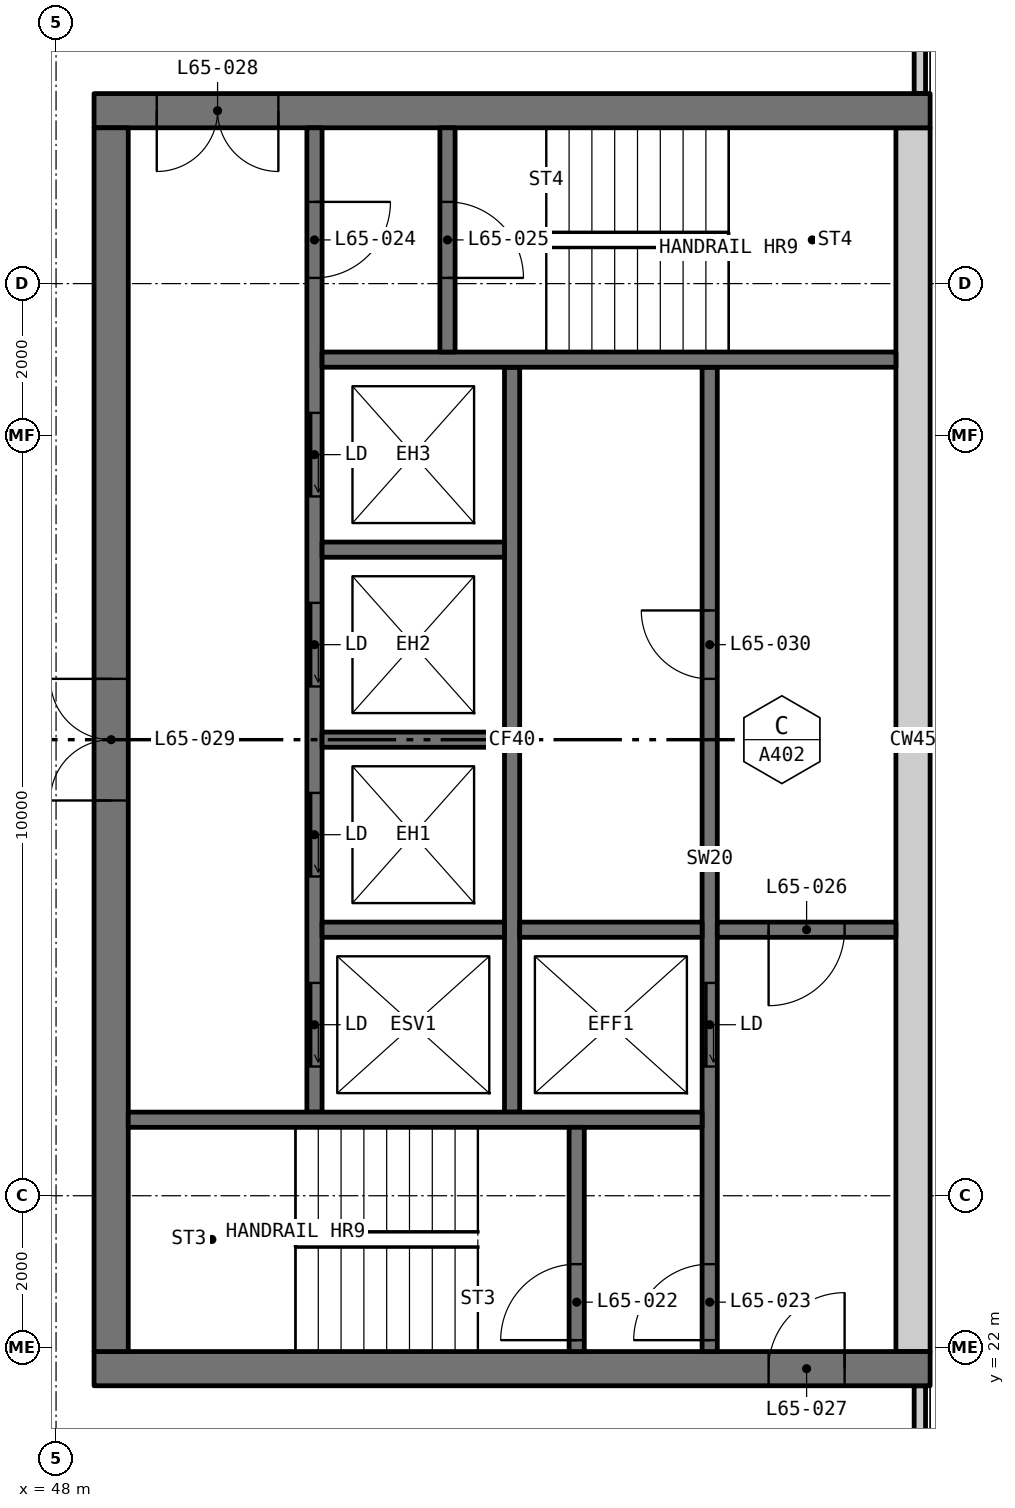
"""IFC4 building model, lengths in metres.
Left out: names, types, materials, properties, quantities, classifications, styles, units other than length and angle.
Written with IfcOpenShell. Run it as: python <this file> out.ifc"""

import sys

from ifc_helpers import new_model, si_unit, direction, frame, frame_2d, origin, place, context, subcontext, project, spatial, rectangle, extrude, element, fill, save


model = new_model("IFC4")
c1 = context("Model", 3, precision=1e-05, world=origin(), true_north=direction((0.0, 1.0)))
c2 = subcontext(c1, "Body", "Model", "MODEL_VIEW")
j1 = project(units=[si_unit("LENGTHUNIT", "METRE"), si_unit("PLANEANGLEUNIT", "RADIAN")], contexts=[c1])
p1 = place(None, origin())
s1 = spatial("IfcSite", under=j1, at=p1, CompositionType="ELEMENT")
p2 = place(p1, origin())
s2 = spatial("IfcBuilding", under=s1, at=p2, CompositionType="ELEMENT")
p3 = place(p2, frame((0.0, 0.0, 242.1)))
s3 = spatial("IfcBuildingStorey", under=s2, at=p3, CompositionType="ELEMENT", Elevation=242.1)
for number, where, z_axis, x_axis in (
    (1, (59.365, 18.71, 0.0), (0.0, 0.0, 1.0), (0.0, 1.0, 0.0)),
    (2, (59.365, 38.5, 0.0), (0.0, 0.0, 1.0), (0.0, 1.0, 0.0)),
):
    element("IfcWall", number, at=place(p3, frame(where, z_axis=z_axis, x_axis=x_axis)), inside=s3, PredefinedType="ELEMENTEDWALL", context=c2, shape_type="SweptSolid", body=[
        extrude(rectangle(XDim=2.79, YDim=0.15, at=frame_2d((1.395, 0.0))), origin(), (0.0, 0.0, 1.0), 3.05),
    ])
p4 = place(p3, frame((59.5, 21.725, 0.0), z_axis=(0.0, 0.0, 1.0), x_axis=(-1.0, 0.0, 0.0)))
e3 = element("IfcWall", 3, at=p4, inside=s3, PredefinedType="SHEAR", context=c2, shape_type="SweptSolid", body=[
    extrude(rectangle(XDim=11.0, YDim=0.45, at=frame_2d((5.5, 0.0))), origin(), (0.0, 0.0, 1.0), 3.05),
])
p5 = place(p4, frame((1.125, 0.0, 0.0)))
e4 = element("IfcOpeningElement", 4, at=p5, cuts=e3, PredefinedType="OPENING", context=c2, shape_type="SweptSolid", body=[
    extrude(rectangle(XDim=1.0, YDim=2.1, at=frame_2d((0.5, 1.05))), frame((0.0, 0.235, 0.0), z_axis=(0.0, -1.0, 0.0), x_axis=(1.0, 0.0, 0.0)), (0.0, 0.0, 1.0), 0.47),
])
p6 = place(p3, frame((59.5, 38.275, 0.0), z_axis=(0.0, 0.0, 1.0), x_axis=(-1.0, 0.0, 0.0)))
e5 = element("IfcWall", 5, at=p6, inside=s3, PredefinedType="SHEAR", context=c2, shape_type="SweptSolid", body=[
    extrude(rectangle(XDim=11.0, YDim=0.45, at=frame_2d((5.5, 0.0))), origin(), (0.0, 0.0, 1.0), 3.05),
])
p7 = place(p6, frame((8.575, 0.0, 0.0)))
e6 = element("IfcOpeningElement", 6, at=p7, cuts=e5, PredefinedType="OPENING", context=c2, shape_type="SweptSolid", body=[
    extrude(rectangle(XDim=1.6, YDim=2.1, at=frame_2d((0.8, 1.05))), frame((0.0, 0.235, 0.0), z_axis=(0.0, -1.0, 0.0), x_axis=(1.0, 0.0, 0.0)), (0.0, 0.0, 1.0), 0.47),
])
p8 = place(p3, frame((59.275, 21.95, 0.0), z_axis=(0.0, 0.0, 1.0), x_axis=(0.0, 1.0, 0.0)))
e7 = element("IfcWall", 7, at=p8, inside=s3, PredefinedType="SHEAR", context=c2, shape_type="SweptSolid", body=[
    extrude(rectangle(XDim=16.1, YDim=0.45, at=frame_2d((8.05, 0.0))), origin(), (0.0, 0.0, 1.0), 3.05),
])
p9 = place(p3, frame((48.725, 21.95, 0.0), z_axis=(0.0, 0.0, 1.0), x_axis=(0.0, 1.0, 0.0)))
e8 = element("IfcWall", 8, at=p9, inside=s3, PredefinedType="SHEAR", context=c2, shape_type="SweptSolid", body=[
    extrude(rectangle(XDim=16.1, YDim=0.45, at=frame_2d((8.05, 0.0))), origin(), (0.0, 0.0, 1.0), 3.05),
])
p10 = place(p9, frame((7.25, 0.0, 0.0)))
e9 = element("IfcOpeningElement", 9, at=p10, cuts=e8, PredefinedType="OPENING", context=c2, shape_type="SweptSolid", body=[
    extrude(rectangle(XDim=1.6, YDim=2.1, at=frame_2d((0.8, 1.05))), frame((0.0, 0.235, 0.0), z_axis=(0.0, -1.0, 0.0), x_axis=(1.0, 0.0, 0.0)), (0.0, 0.0, 1.0), 0.47),
])
p11 = place(p3, frame((56.6, 21.95, 0.0), z_axis=(0.0, 0.0, 1.0), x_axis=(0.0, 1.0, 0.0)))
e10 = element("IfcWall", 10, at=p11, inside=s3, PredefinedType="SOLIDWALL", context=c2, shape_type="SweptSolid", body=[
    extrude(rectangle(XDim=12.95, YDim=0.2, at=frame_2d((6.475, 0.0))), origin(), (0.0, 0.0, 1.0), 3.05),
])
p12 = place(p11, frame((3.75, 0.0, 0.0)))
e11 = element("IfcOpeningElement", 11, at=p12, cuts=e10, PredefinedType="OPENING", context=c2, shape_type="SweptSolid", body=[
    extrude(rectangle(XDim=1.1, YDim=2.1, at=frame_2d((0.55, 1.05))), frame((0.0, 0.11, 0.0), z_axis=(0.0, -1.0, 0.0), x_axis=(1.0, 0.0, 0.0)), (0.0, 0.0, 1.0), 0.22),
])
p13 = place(p11, frame((0.15, 0.0, 0.0)))
e12 = element("IfcOpeningElement", 12, at=p13, cuts=e10, PredefinedType="OPENING", context=c2, shape_type="SweptSolid", body=[
    extrude(rectangle(XDim=1.0, YDim=2.1, at=frame_2d((0.5, 1.05))), frame((0.0, 0.11, 0.0), z_axis=(0.0, -1.0, 0.0), x_axis=(1.0, 0.0, 0.0)), (0.0, 0.0, 1.0), 0.22),
])
p14 = place(p11, frame((8.85, 0.0, 0.0)))
e13 = element("IfcOpeningElement", 13, at=p14, cuts=e10, PredefinedType="OPENING", context=c2, shape_type="SweptSolid", body=[
    extrude(rectangle(XDim=0.9, YDim=2.1, at=frame_2d((0.45, 1.05))), frame((0.0, 0.11, 0.0), z_axis=(0.0, -1.0, 0.0), x_axis=(1.0, 0.0, 0.0)), (0.0, 0.0, 1.0), 0.22),
])
p15 = place(p3, frame((51.4, 25.1, 0.0), z_axis=(0.0, 0.0, 1.0), x_axis=(0.0, 1.0, 0.0)))
e14 = element("IfcWall", 14, at=p15, inside=s3, PredefinedType="SOLIDWALL", context=c2, shape_type="SweptSolid", body=[
    extrude(rectangle(XDim=12.95, YDim=0.2, at=frame_2d((6.475, 0.0))), origin(), (0.0, 0.0, 1.0), 3.05),
])
p16 = place(p15, frame((0.6, 0.0, 0.0)))
e15 = element("IfcOpeningElement", 15, at=p16, cuts=e14, PredefinedType="OPENING", context=c2, shape_type="SweptSolid", body=[
    extrude(rectangle(XDim=1.1, YDim=2.1, at=frame_2d((0.55, 1.05))), frame((0.0, 0.11, 0.0), z_axis=(0.0, -1.0, 0.0), x_axis=(1.0, 0.0, 0.0)), (0.0, 0.0, 1.0), 0.22),
])
p17 = place(p15, frame((3.1, 0.0, 0.0)))
e16 = element("IfcOpeningElement", 16, at=p17, cuts=e14, PredefinedType="OPENING", context=c2, shape_type="SweptSolid", body=[
    extrude(rectangle(XDim=1.1, YDim=2.1, at=frame_2d((0.55, 1.05))), frame((0.0, 0.11, 0.0), z_axis=(0.0, -1.0, 0.0), x_axis=(1.0, 0.0, 0.0)), (0.0, 0.0, 1.0), 0.22),
])
p18 = place(p15, frame((5.6, 0.0, 0.0)))
e17 = element("IfcOpeningElement", 17, at=p18, cuts=e14, PredefinedType="OPENING", context=c2, shape_type="SweptSolid", body=[
    extrude(rectangle(XDim=1.1, YDim=2.1, at=frame_2d((0.55, 1.05))), frame((0.0, 0.11, 0.0), z_axis=(0.0, -1.0, 0.0), x_axis=(1.0, 0.0, 0.0)), (0.0, 0.0, 1.0), 0.22),
])
p19 = place(p15, frame((8.1, 0.0, 0.0)))
e18 = element("IfcOpeningElement", 18, at=p19, cuts=e14, PredefinedType="OPENING", context=c2, shape_type="SweptSolid", body=[
    extrude(rectangle(XDim=1.1, YDim=2.1, at=frame_2d((0.55, 1.05))), frame((0.0, 0.11, 0.0), z_axis=(0.0, -1.0, 0.0), x_axis=(1.0, 0.0, 0.0)), (0.0, 0.0, 1.0), 0.22),
])
p20 = place(p15, frame((10.975, 0.0, 0.0)))
e19 = element("IfcOpeningElement", 19, at=p20, cuts=e14, PredefinedType="OPENING", context=c2, shape_type="SweptSolid", body=[
    extrude(rectangle(XDim=1.0, YDim=2.1, at=frame_2d((0.5, 1.05))), frame((0.0, 0.11, 0.0), z_axis=(0.0, -1.0, 0.0), x_axis=(1.0, 0.0, 0.0)), (0.0, 0.0, 1.0), 0.22),
])
p21 = place(p3, frame((54.0, 25.1, 0.0), z_axis=(0.0, 0.0, 1.0), x_axis=(0.0, 1.0, 0.0)))
e20 = element("IfcWall", 20, at=p21, inside=s3, PredefinedType="SOLIDWALL", context=c2, shape_type="SweptSolid", body=[
    extrude(rectangle(XDim=9.8, YDim=0.2, at=frame_2d((4.9, 0.0))), origin(), (0.0, 0.0, 1.0), 3.05),
])
for number, where, z_axis, x_axis in (
    (21, (56.5, 25.0, 0.0), (0.0, 0.0, 1.0), (-1.0, 0.0, 0.0)),
    (22, (59.05, 35.0, 0.0), (0.0, 0.0, 1.0), (-1.0, 0.0, 0.0)),
):
    element("IfcWall", number, at=place(p3, frame(where, z_axis=z_axis, x_axis=x_axis)), inside=s3, PredefinedType="SOLIDWALL", context=c2, shape_type="SweptSolid", body=[
        extrude(rectangle(XDim=7.55, YDim=0.2, at=frame_2d((3.775, 0.0))), origin(), (0.0, 0.0, 1.0), 3.05),
    ])
p22 = place(p3, frame((59.05, 27.5, 0.0), z_axis=(0.0, 0.0, 1.0), x_axis=(-1.0, 0.0, 0.0)))
e23 = element("IfcWall", 23, at=p22, inside=s3, PredefinedType="SOLIDWALL", context=c2, shape_type="SweptSolid", body=[
    extrude(rectangle(XDim=2.35, YDim=0.2, at=frame_2d((1.175, 0.0))), origin(), (0.0, 0.0, 1.0), 3.05),
])
p23 = place(p22, frame((0.675, 0.0, 0.0)))
e24 = element("IfcOpeningElement", 24, at=p23, cuts=e23, PredefinedType="OPENING", context=c2, shape_type="SweptSolid", body=[
    extrude(rectangle(XDim=1.0, YDim=2.1, at=frame_2d((0.5, 1.05))), frame((0.0, 0.11, 0.0), z_axis=(0.0, -1.0, 0.0), x_axis=(1.0, 0.0, 0.0)), (0.0, 0.0, 1.0), 0.22),
])
p24 = place(p3, frame((54.85, 21.95, 0.0), z_axis=(0.0, 0.0, 1.0), x_axis=(0.0, 1.0, 0.0)))
e25 = element("IfcWall", 25, at=p24, inside=s3, PredefinedType="SOLIDWALL", context=c2, shape_type="SweptSolid", body=[
    extrude(rectangle(XDim=2.95, YDim=0.2, at=frame_2d((1.475, 0.0))), origin(), (0.0, 0.0, 1.0), 3.05),
])
p25 = place(p24, frame((0.15, 0.0, 0.0)))
e26 = element("IfcOpeningElement", 26, at=p25, cuts=e25, PredefinedType="OPENING", context=c2, shape_type="SweptSolid", body=[
    extrude(rectangle(XDim=1.0, YDim=2.1, at=frame_2d((0.5, 1.05))), frame((0.0, 0.11, 0.0), z_axis=(0.0, -1.0, 0.0), x_axis=(1.0, 0.0, 0.0)), (0.0, 0.0, 1.0), 0.22),
])
p26 = place(p3, frame((53.15, 35.1, 0.0), z_axis=(0.0, 0.0, 1.0), x_axis=(0.0, 1.0, 0.0)))
e27 = element("IfcWall", 27, at=p26, inside=s3, PredefinedType="SOLIDWALL", context=c2, shape_type="SweptSolid", body=[
    extrude(rectangle(XDim=2.95, YDim=0.2, at=frame_2d((1.475, 0.0))), origin(), (0.0, 0.0, 1.0), 3.05),
])
p27 = place(p26, frame((0.975, 0.0, 0.0)))
e28 = element("IfcOpeningElement", 28, at=p27, cuts=e27, PredefinedType="OPENING", context=c2, shape_type="SweptSolid", body=[
    extrude(rectangle(XDim=1.0, YDim=2.1, at=frame_2d((0.5, 1.05))), frame((0.0, 0.11, 0.0), z_axis=(0.0, -1.0, 0.0), x_axis=(1.0, 0.0, 0.0)), (0.0, 0.0, 1.0), 0.22),
])
for number, where, z_axis, x_axis in (
    (29, (56.5, 27.5, 0.0), (0.0, 0.0, 1.0), (-1.0, 0.0, 0.0)),
    (30, (53.9, 27.5, 0.0), (0.0, 0.0, 1.0), (-1.0, 0.0, 0.0)),
    (31, (53.9, 30.0, 0.0), (0.0, 0.0, 1.0), (-1.0, 0.0, 0.0)),
    (32, (53.9, 32.5, 0.0), (0.0, 0.0, 1.0), (-1.0, 0.0, 0.0)),
):
    element("IfcWall", number, at=place(p3, frame(where, z_axis=z_axis, x_axis=x_axis)), inside=s3, PredefinedType="SOLIDWALL", context=c2, shape_type="SweptSolid", body=[
        extrude(rectangle(XDim=2.4, YDim=0.2, at=frame_2d((1.2, 0.0))), origin(), (0.0, 0.0, 1.0), 3.05),
    ])
p28 = place(p16, origin())
e33 = element("IfcDoor", 33, at=p28, inside=s3, OperationType="SLIDING_TO_LEFT", PredefinedType="DOOR", context=c2, shape_type="SweptSolid", body=[
    extrude(rectangle(XDim=1.1, YDim=2.1, at=frame_2d((0.55, 1.05))), frame((0.0, 0.025, 0.0), z_axis=(0.0, -1.0, 0.0), x_axis=(1.0, 0.0, 0.0)), (0.0, 0.0, 1.0), 0.05),
])
fill(e15, e33)
p29 = place(p17, origin())
e34 = element("IfcDoor", 34, at=p29, inside=s3, OperationType="SLIDING_TO_LEFT", PredefinedType="DOOR", context=c2, shape_type="SweptSolid", body=[
    extrude(rectangle(XDim=1.1, YDim=2.1, at=frame_2d((0.55, 1.05))), frame((0.0, 0.025, 0.0), z_axis=(0.0, -1.0, 0.0), x_axis=(1.0, 0.0, 0.0)), (0.0, 0.0, 1.0), 0.05),
])
fill(e16, e34)
p30 = place(p18, origin())
e35 = element("IfcDoor", 35, at=p30, inside=s3, OperationType="SLIDING_TO_LEFT", PredefinedType="DOOR", context=c2, shape_type="SweptSolid", body=[
    extrude(rectangle(XDim=1.1, YDim=2.1, at=frame_2d((0.55, 1.05))), frame((0.0, 0.025, 0.0), z_axis=(0.0, -1.0, 0.0), x_axis=(1.0, 0.0, 0.0)), (0.0, 0.0, 1.0), 0.05),
])
fill(e17, e35)
p31 = place(p19, origin())
e36 = element("IfcDoor", 36, at=p31, inside=s3, OperationType="SLIDING_TO_LEFT", PredefinedType="DOOR", context=c2, shape_type="SweptSolid", body=[
    extrude(rectangle(XDim=1.1, YDim=2.1, at=frame_2d((0.55, 1.05))), frame((0.0, 0.025, 0.0), z_axis=(0.0, -1.0, 0.0), x_axis=(1.0, 0.0, 0.0)), (0.0, 0.0, 1.0), 0.05),
])
fill(e18, e36)
p32 = place(p12, origin())
e37 = element("IfcDoor", 37, at=p32, inside=s3, OperationType="SLIDING_TO_LEFT", PredefinedType="DOOR", context=c2, shape_type="SweptSolid", body=[
    extrude(rectangle(XDim=1.1, YDim=2.1, at=frame_2d((0.55, 1.05))), frame((0.0, 0.025, 0.0), z_axis=(0.0, -1.0, 0.0), x_axis=(1.0, 0.0, 0.0)), (0.0, 0.0, 1.0), 0.05),
])
fill(e11, e37)
p33 = place(p25, origin())
e38 = element("IfcDoor", 38, at=p33, inside=s3, OperationType="SINGLE_SWING_RIGHT", PredefinedType="DOOR", context=c2, shape_type="SweptSolid", body=[
    extrude(rectangle(XDim=1.0, YDim=2.1, at=frame_2d((0.5, 1.05))), frame((0.0, 0.025, 0.0), z_axis=(0.0, -1.0, 0.0), x_axis=(1.0, 0.0, 0.0)), (0.0, 0.0, 1.0), 0.05),
])
fill(e26, e38)
p34 = place(p13, origin())
e39 = element("IfcDoor", 39, at=p34, inside=s3, OperationType="SINGLE_SWING_RIGHT", PredefinedType="DOOR", context=c2, shape_type="SweptSolid", body=[
    extrude(rectangle(XDim=1.0, YDim=2.1, at=frame_2d((0.5, 1.05))), frame((0.0, 0.025, 0.0), z_axis=(0.0, -1.0, 0.0), x_axis=(1.0, 0.0, 0.0)), (0.0, 0.0, 1.0), 0.05),
])
fill(e12, e39)
p35 = place(p20, frame((1.0, 0.0, 0.0), x_axis=(-1.0, 0.0, 0.0)))
e40 = element("IfcDoor", 40, at=p35, inside=s3, OperationType="SINGLE_SWING_RIGHT", PredefinedType="DOOR", context=c2, shape_type="SweptSolid", body=[
    extrude(rectangle(XDim=1.0, YDim=2.1, at=frame_2d((0.5, 1.05))), frame((0.0, 0.025, 0.0), z_axis=(0.0, -1.0, 0.0), x_axis=(1.0, 0.0, 0.0)), (0.0, 0.0, 1.0), 0.05),
])
fill(e19, e40)
p36 = place(p27, frame((1.0, 0.0, 0.0), x_axis=(-1.0, 0.0, 0.0)))
e41 = element("IfcDoor", 41, at=p36, inside=s3, OperationType="SINGLE_SWING_LEFT", PredefinedType="DOOR", context=c2, shape_type="SweptSolid", body=[
    extrude(rectangle(XDim=1.0, YDim=2.1, at=frame_2d((0.5, 1.05))), frame((0.0, 0.025, 0.0), z_axis=(0.0, -1.0, 0.0), x_axis=(1.0, 0.0, 0.0)), (0.0, 0.0, 1.0), 0.05),
])
fill(e28, e41)
p37 = place(p23, origin())
e42 = element("IfcDoor", 42, at=p37, inside=s3, OperationType="SINGLE_SWING_LEFT", PredefinedType="DOOR", context=c2, shape_type="SweptSolid", body=[
    extrude(rectangle(XDim=1.0, YDim=2.1, at=frame_2d((0.5, 1.05))), frame((0.0, 0.025, 0.0), z_axis=(0.0, -1.0, 0.0), x_axis=(1.0, 0.0, 0.0)), (0.0, 0.0, 1.0), 0.05),
])
fill(e24, e42)
p38 = place(p5, frame((1.0, 0.0, 0.0), x_axis=(-1.0, 0.0, 0.0)))
e43 = element("IfcDoor", 43, at=p38, inside=s3, OperationType="SINGLE_SWING_LEFT", PredefinedType="DOOR", context=c2, shape_type="SweptSolid", body=[
    extrude(rectangle(XDim=1.0, YDim=2.1, at=frame_2d((0.5, 1.05))), frame((0.0, 0.025, 0.0), z_axis=(0.0, -1.0, 0.0), x_axis=(1.0, 0.0, 0.0)), (0.0, 0.0, 1.0), 0.05),
])
fill(e4, e43)
p39 = place(p7, origin())
e44 = element("IfcDoor", 44, at=p39, inside=s3, OperationType="DOUBLE_DOOR_SINGLE_SWING", PredefinedType="DOOR", context=c2, shape_type="SweptSolid", body=[
    extrude(rectangle(XDim=1.6, YDim=2.1, at=frame_2d((0.8, 1.05))), frame((0.0, 0.025, 0.0), z_axis=(0.0, -1.0, 0.0), x_axis=(1.0, 0.0, 0.0)), (0.0, 0.0, 1.0), 0.05),
])
fill(e6, e44)
p40 = place(p10, origin())
e45 = element("IfcDoor", 45, at=p40, inside=s3, OperationType="DOUBLE_DOOR_SINGLE_SWING", PredefinedType="DOOR", context=c2, shape_type="SweptSolid", body=[
    extrude(rectangle(XDim=1.6, YDim=2.1, at=frame_2d((0.8, 1.05))), frame((0.0, 0.025, 0.0), z_axis=(0.0, -1.0, 0.0), x_axis=(1.0, 0.0, 0.0)), (0.0, 0.0, 1.0), 0.05),
])
fill(e9, e45)
p41 = place(p14, origin())
e46 = element("IfcDoor", 46, at=p41, inside=s3, OperationType="SINGLE_SWING_LEFT", PredefinedType="DOOR", context=c2, shape_type="SweptSolid", body=[
    extrude(rectangle(XDim=0.9, YDim=2.1, at=frame_2d((0.45, 1.05))), frame((0.0, 0.025, 0.0), z_axis=(0.0, -1.0, 0.0), x_axis=(1.0, 0.0, 0.0)), (0.0, 0.0, 1.0), 0.05),
])
fill(e13, e46)
save(model, sys.argv[1])
